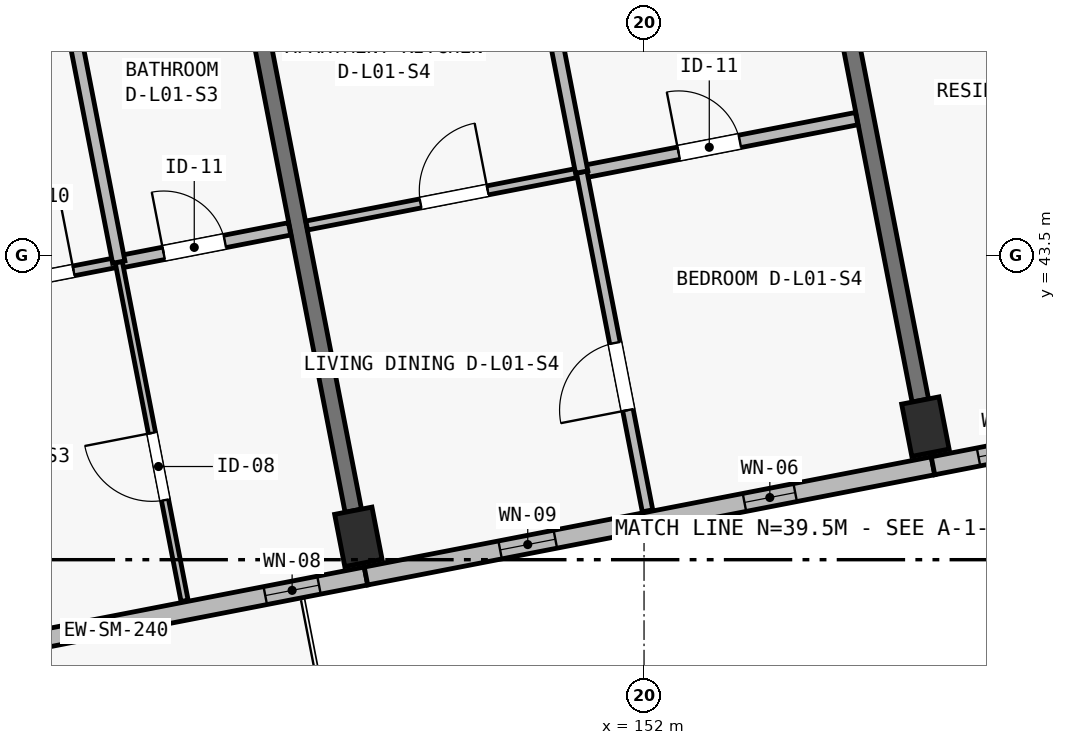
"""IFC4 building model, lengths in metres.
Left out: names, types, materials, properties, quantities, classifications, styles, units other than length and angle.
Written with IfcOpenShell. Run it as: python <this file> out.ifc"""

import sys

from ifc_helpers import new_model, si_unit, direction, frame, frame_2d, origin, origin_2d, place, context, subcontext, project, spatial, rectangle, extrude, element, fill, save


model = new_model("IFC4")
c1 = context("Model", 3, precision=1e-05, world=origin(), true_north=direction((0.0, 1.0)))
c2 = subcontext(c1, "Body", "Model", "MODEL_VIEW")
j1 = project(units=[si_unit("LENGTHUNIT", "METRE"), si_unit("PLANEANGLEUNIT", "RADIAN")], contexts=[c1])
p1 = place(None, origin())
s1 = spatial("IfcSite", under=j1, at=p1, CompositionType="ELEMENT")
p2 = place(p1, origin())
s2 = spatial("IfcBuilding", under=s1, at=p2, CompositionType="ELEMENT")
p3 = place(p2, frame((0.0, 0.0, 4.5)))
s3 = spatial("IfcBuildingStorey", under=s2, at=p3, CompositionType="ELEMENT", Elevation=4.5)
for number, where, z_axis, x_axis in (
    (1, (148.241, 39.801, 0.0), (0.0, 0.0, 1.0), (0.982, 0.191, 0.0)),
    (2, (155.702, 41.251, 0.0), (0.0, 0.0, 1.0), (0.982, 0.191, 0.0)),
):
    element("IfcColumn", number, at=place(p3, frame(where, z_axis=z_axis, x_axis=x_axis)), inside=s3, PredefinedType="COLUMN", context=c2, shape_type="SweptSolid", body=[
        extrude(rectangle(XDim=0.5, YDim=0.7, at=origin_2d()), origin(), (0.0, 0.0, 1.0), 3.9),
    ])
p4 = place(p3, frame((148.175, 40.144, -0.25), z_axis=(0.0, 0.0, 1.0), x_axis=(-0.190812837813, 0.981626436546, 0.0)))
e3 = element("IfcWall", 3, at=p4, inside=s3, PredefinedType="SHEAR", context=c2, shape_type="SweptSolid", body=[
    extrude(rectangle(XDim=6.9, YDim=0.22, at=frame_2d((3.45, 0.0))), origin(), (0.0, 0.0, 1.0), 3.4),
])
p5 = place(p3, frame((155.635, 41.594, -0.25), z_axis=(0.0, 0.0, 1.0), x_axis=(-0.190819465253, 0.981625148252, 0.0)))
e4 = element("IfcWall", 4, at=p5, inside=s3, PredefinedType="SHEAR", context=c2, shape_type="SweptSolid", body=[
    extrude(rectangle(XDim=6.9, YDim=0.22, at=frame_2d((3.45, 0.0))), origin(), (0.0, 0.0, 1.0), 3.4),
])
p6 = place(p3, frame((148.342, 39.285, 0.0), z_axis=(0.0, 0.0, 1.0), x_axis=(-0.981631269434, -0.190787973596, 0.0)))
e5 = element("IfcWall", 5, at=p6, inside=s3, PredefinedType="SOLIDWALL", context=c2, shape_type="SweptSolid", body=[
    extrude(rectangle(XDim=7.6, YDim=0.24, at=frame_2d((3.8, 0.0))), origin(), (0.0, 0.0, 1.0), 3.65),
])
p7 = place(p6, frame((5.169, 0.0, 0.0)))
e6 = element("IfcOpeningElement", 6, at=p7, cuts=e5, PredefinedType="OPENING", context=c2, shape_type="SweptSolid", body=[
    extrude(rectangle(XDim=1.5, YDim=2.12, at=frame_2d((0.75, 1.06))), frame((0.0, 0.135, 0.0), z_axis=(0.0, -1.0, 0.0), x_axis=(1.0, 0.0, 0.0)), (0.0, 0.0, 1.0), 0.27),
])
p8 = place(p6, frame((0.63, 0.0, 0.46)))
e7 = element("IfcOpeningElement", 7, at=p8, cuts=e5, PredefinedType="OPENING", context=c2, shape_type="SweptSolid", body=[
    extrude(rectangle(XDim=0.72, YDim=2.16, at=frame_2d((0.36, 1.08))), frame((0.0, 0.135, 0.0), z_axis=(0.0, -1.0, 0.0), x_axis=(1.0, 0.0, 0.0)), (0.0, 0.0, 1.0), 0.27),
])
p9 = place(p3, frame((155.802, 40.735, 0.0), z_axis=(0.0, 0.0, 1.0), x_axis=(-0.981626422232, -0.190812911449, 0.0)))
e8 = element("IfcWall", 8, at=p9, inside=s3, PredefinedType="SOLIDWALL", context=c2, shape_type="SweptSolid", body=[
    extrude(rectangle(XDim=7.6, YDim=0.24, at=frame_2d((3.8, 0.0))), origin(), (0.0, 0.0, 1.0), 3.65),
])
p10 = place(p9, frame((1.847, 0.0, 0.52)))
e9 = element("IfcOpeningElement", 9, at=p10, cuts=e8, PredefinedType="OPENING", context=c2, shape_type="SweptSolid", body=[
    extrude(rectangle(XDim=0.68, YDim=2.24, at=frame_2d((0.34, 1.12))), frame((0.0, 0.135, 0.0), z_axis=(0.0, -1.0, 0.0), x_axis=(1.0, 0.0, 0.0)), (0.0, 0.0, 1.0), 0.27),
])
p11 = place(p9, frame((5.062, 0.0, 0.52)))
e10 = element("IfcOpeningElement", 10, at=p11, cuts=e8, PredefinedType="OPENING", context=c2, shape_type="SweptSolid", body=[
    extrude(rectangle(XDim=0.74, YDim=2.26, at=frame_2d((0.37, 1.13))), frame((0.0, 0.135, 0.0), z_axis=(0.0, -1.0, 0.0), x_axis=(1.0, 0.0, 0.0)), (0.0, 0.0, 1.0), 0.27),
])
p12 = place(p3, frame((163.778, 42.286, 0.0), z_axis=(0.0, 0.0, 1.0), x_axis=(-0.981628367112, -0.190802905848, 0.0)))
e11 = element("IfcWall", 11, at=p12, inside=s3, PredefinedType="SOLIDWALL", context=c2, shape_type="SweptSolid", body=[
    extrude(rectangle(XDim=8.125, YDim=0.24, at=frame_2d((4.062, 0.0))), origin(), (0.0, 0.0, 1.0), 3.65),
])
p13 = place(p12, frame((1.223, 0.0, 0.42)))
e12 = element("IfcOpeningElement", 12, at=p13, cuts=e11, PredefinedType="OPENING", context=c2, shape_type="SweptSolid", body=[
    extrude(rectangle(XDim=0.78, YDim=2.2, at=frame_2d((0.39, 1.1))), frame((0.0, 0.135, 0.0), z_axis=(0.0, -1.0, 0.0), x_axis=(1.0, 0.0, 0.0)), (0.0, 0.0, 1.0), 0.27),
])
p14 = place(p12, frame((3.835, 0.0, 0.42)))
e13 = element("IfcOpeningElement", 13, at=p14, cuts=e11, PredefinedType="OPENING", context=c2, shape_type="SweptSolid", body=[
    extrude(rectangle(XDim=0.84, YDim=2.28, at=frame_2d((0.42, 1.14))), frame((0.0, 0.135, 0.0), z_axis=(0.0, -1.0, 0.0), x_axis=(1.0, 0.0, 0.0)), (0.0, 0.0, 1.0), 0.27),
])
p15 = place(p12, frame((6.655, 0.0, 0.48)))
e14 = element("IfcOpeningElement", 14, at=p15, cuts=e11, PredefinedType="OPENING", context=c2, shape_type="SweptSolid", body=[
    extrude(rectangle(XDim=0.86, YDim=2.36, at=frame_2d((0.43, 1.18))), frame((0.0, 0.135, 0.0), z_axis=(0.0, -1.0, 0.0), x_axis=(1.0, 0.0, 0.0)), (0.0, 0.0, 1.0), 0.27),
])
p16 = place(p3, frame((140.102, 42.446, 0.0), z_axis=(0.0, 0.0, 1.0), x_axis=(0.981621892043, 0.19083621528, 0.0)))
e15 = element("IfcWall", 15, at=p16, inside=s3, PredefinedType="PARTITIONING", context=c2, shape_type="SweptSolid", body=[
    extrude(rectangle(XDim=5.08, YDim=0.13, at=frame_2d((2.54, 0.0))), origin(), (0.0, 0.0, 1.0), 3.62),
])
p17 = place(p16, frame((3.595, 0.0, 0.0)))
e16 = element("IfcOpeningElement", 16, at=p17, cuts=e15, PredefinedType="OPENING", context=c2, shape_type="SweptSolid", body=[
    extrude(rectangle(XDim=0.88, YDim=2.1, at=frame_2d((0.44, 1.05))), frame((0.0, 0.08, 0.0), z_axis=(0.0, -1.0, 0.0), x_axis=(1.0, 0.0, 0.0)), (0.0, 0.0, 1.0), 0.16),
])
p18 = place(p3, frame((145.089, 43.416, 0.0), z_axis=(0.0, 0.0, 1.0), x_axis=(0.981640351498, 0.190741239147, 0.0)))
e17 = element("IfcWall", 17, at=p18, inside=s3, PredefinedType="PLUMBINGWALL", context=c2, shape_type="SweptSolid", body=[
    extrude(rectangle(XDim=2.29, YDim=0.165, at=frame_2d((1.145, 0.0))), origin(), (0.0, 0.0, 1.0), 3.62),
])
p19 = place(p18, frame((0.602, 0.0, 0.0)))
e18 = element("IfcOpeningElement", 18, at=p19, cuts=e17, PredefinedType="OPENING", context=c2, shape_type="SweptSolid", body=[
    extrude(rectangle(XDim=0.82, YDim=2.08, at=frame_2d((0.41, 1.04))), frame((0.0, 0.097, 0.0), z_axis=(0.0, -1.0, 0.0), x_axis=(1.0, 0.0, 0.0)), (0.0, 0.0, 1.0), 0.195),
])
p20 = place(p3, frame((145.955, 38.959, 0.0), z_axis=(0.0, 0.0, 1.0), x_axis=(-0.190797690541, 0.981629380817, 0.0)))
e19 = element("IfcWall", 19, at=p20, inside=s3, PredefinedType="PARTITIONING", context=c2, shape_type="SweptSolid", body=[
    extrude(rectangle(XDim=4.54, YDim=0.095, at=frame_2d((2.27, 0.0))), origin(), (0.0, 0.0, 1.0), 3.62),
])
p21 = place(p20, frame((1.35, 0.0, 0.0)))
e20 = element("IfcOpeningElement", 20, at=p21, cuts=e19, PredefinedType="OPENING", context=c2, shape_type="SweptSolid", body=[
    extrude(rectangle(XDim=0.9, YDim=2.1, at=frame_2d((0.45, 1.05))), frame((0.0, 0.062, 0.0), z_axis=(0.0, -1.0, 0.0), x_axis=(1.0, 0.0, 0.0)), (0.0, 0.0, 1.0), 0.125),
])
p22 = place(p3, frame((145.089, 43.416, 0.0), z_axis=(0.0, 0.0, 1.0), x_axis=(-0.190835887914, 0.981621955686, 0.0)))
e21 = element("IfcWall", 21, at=p22, inside=s3, PredefinedType="PLUMBINGWALL", context=c2, shape_type="SweptSolid", body=[
    extrude(rectangle(XDim=3.87, YDim=0.165, at=frame_2d((1.935, 0.0))), origin(), (0.0, 0.0, 1.0), 3.62),
])
p23 = place(p3, frame((147.562, 43.896, 0.0), z_axis=(0.0, 0.0, 1.0), x_axis=(0.981626422232, 0.190812911449, 0.0)))
e22 = element("IfcWall", 22, at=p23, inside=s3, PredefinedType="PARTITIONING", context=c2, shape_type="SweptSolid", body=[
    extrude(rectangle(XDim=3.685, YDim=0.12, at=frame_2d((1.842, 0.0))), origin(), (0.0, 0.0, 1.0), 3.62),
])
p24 = place(p23, frame((1.525, 0.0, 0.0)))
e23 = element("IfcOpeningElement", 23, at=p24, cuts=e22, PredefinedType="OPENING", context=c2, shape_type="SweptSolid", body=[
    extrude(rectangle(XDim=0.9, YDim=2.1, at=frame_2d((0.45, 1.05))), frame((0.0, 0.075, 0.0), z_axis=(0.0, -1.0, 0.0), x_axis=(1.0, 0.0, 0.0)), (0.0, 0.0, 1.0), 0.15),
])
p25 = place(p3, frame((151.18, 44.599, 0.0), z_axis=(0.0, 0.0, 1.0), x_axis=(0.981628834294, 0.190800502313, 0.0)))
e24 = element("IfcWall", 24, at=p25, inside=s3, PredefinedType="PLUMBINGWALL", context=c2, shape_type="SweptSolid", body=[
    extrude(rectangle(XDim=3.685, YDim=0.165, at=frame_2d((1.843, 0.0))), origin(), (0.0, 0.0, 1.0), 3.62),
])
p26 = place(p25, frame((1.3, 0.0, 0.0)))
e25 = element("IfcOpeningElement", 25, at=p26, cuts=e24, PredefinedType="OPENING", context=c2, shape_type="SweptSolid", body=[
    extrude(rectangle(XDim=0.82, YDim=2.08, at=frame_2d((0.41, 1.04))), frame((0.0, 0.097, 0.0), z_axis=(0.0, -1.0, 0.0), x_axis=(1.0, 0.0, 0.0)), (0.0, 0.0, 1.0), 0.195),
])
p27 = place(p3, frame((152.046, 40.143, 0.0), z_axis=(0.0, 0.0, 1.0), x_axis=(-0.190849508215, 0.981619307682, 0.0)))
e26 = element("IfcWall", 26, at=p27, inside=s3, PredefinedType="PARTITIONING", context=c2, shape_type="SweptSolid", body=[
    extrude(rectangle(XDim=4.54, YDim=0.14, at=frame_2d((2.27, 0.0))), origin(), (0.0, 0.0, 1.0), 3.62),
])
p28 = place(p27, frame((1.35, 0.0, 0.0)))
e27 = element("IfcOpeningElement", 27, at=p28, cuts=e26, PredefinedType="OPENING", context=c2, shape_type="SweptSolid", body=[
    extrude(rectangle(XDim=0.9, YDim=2.1, at=frame_2d((0.45, 1.05))), frame((0.0, 0.085, 0.0), z_axis=(0.0, -1.0, 0.0), x_axis=(1.0, 0.0, 0.0)), (0.0, 0.0, 1.0), 0.17),
])
p29 = place(p3, frame((151.18, 44.599, 0.0), z_axis=(0.0, 0.0, 1.0), x_axis=(-0.190763284403, 0.981636067656, 0.0)))
e28 = element("IfcWall", 28, at=p29, inside=s3, PredefinedType="PLUMBINGWALL", context=c2, shape_type="SweptSolid", body=[
    extrude(rectangle(XDim=3.87, YDim=0.165, at=frame_2d((1.935, 0.0))), origin(), (0.0, 0.0, 1.0), 3.62),
])
p30 = place(p8, origin())
e29 = element("IfcWindow", 29, at=p30, inside=s3, PartitioningType="SINGLE_PANEL", PredefinedType="WINDOW", context=c2, shape_type="SweptSolid", body=[
    extrude(rectangle(XDim=0.72, YDim=2.16, at=frame_2d((0.36, 1.08))), frame((0.0, 0.03, 0.0), z_axis=(0.0, -1.0, 0.0), x_axis=(1.0, 0.0, 0.0)), (0.0, 0.0, 1.0), 0.06),
])
fill(e7, e29)
p31 = place(p10, origin())
e30 = element("IfcWindow", 30, at=p31, inside=s3, PartitioningType="SINGLE_PANEL", PredefinedType="WINDOW", context=c2, shape_type="SweptSolid", body=[
    extrude(rectangle(XDim=0.68, YDim=2.24, at=frame_2d((0.34, 1.12))), frame((0.0, 0.03, 0.0), z_axis=(0.0, -1.0, 0.0), x_axis=(1.0, 0.0, 0.0)), (0.0, 0.0, 1.0), 0.06),
])
fill(e9, e30)
p32 = place(p11, origin())
e31 = element("IfcWindow", 31, at=p32, inside=s3, PartitioningType="SINGLE_PANEL", PredefinedType="WINDOW", context=c2, shape_type="SweptSolid", body=[
    extrude(rectangle(XDim=0.74, YDim=2.26, at=frame_2d((0.37, 1.13))), frame((0.0, 0.03, 0.0), z_axis=(0.0, -1.0, 0.0), x_axis=(1.0, 0.0, 0.0)), (0.0, 0.0, 1.0), 0.06),
])
fill(e10, e31)
p33 = place(p15, origin())
e32 = element("IfcWindow", 32, at=p33, inside=s3, PartitioningType="SINGLE_PANEL", PredefinedType="WINDOW", context=c2, shape_type="SweptSolid", body=[
    extrude(rectangle(XDim=0.86, YDim=2.36, at=frame_2d((0.43, 1.18))), frame((0.0, 0.03, 0.0), z_axis=(0.0, -1.0, 0.0), x_axis=(1.0, 0.0, 0.0)), (0.0, 0.0, 1.0), 0.06),
])
fill(e14, e32)
p34 = place(p17, origin())
e33 = element("IfcDoor", 33, at=p34, inside=s3, OperationType="SINGLE_SWING_RIGHT", PredefinedType="DOOR", context=c2, shape_type="SweptSolid", body=[
    extrude(rectangle(XDim=0.88, YDim=2.1, at=frame_2d((0.44, 1.05))), frame((0.0, 0.025, 0.0), z_axis=(0.0, -1.0, 0.0), x_axis=(1.0, 0.0, 0.0)), (0.0, 0.0, 1.0), 0.05),
])
fill(e16, e33)
p35 = place(p19, origin())
e34 = element("IfcDoor", 34, at=p35, inside=s3, OperationType="SINGLE_SWING_LEFT", PredefinedType="DOOR", context=c2, shape_type="SweptSolid", body=[
    extrude(rectangle(XDim=0.82, YDim=2.08, at=frame_2d((0.41, 1.04))), frame((0.0, 0.025, 0.0), z_axis=(0.0, -1.0, 0.0), x_axis=(1.0, 0.0, 0.0)), (0.0, 0.0, 1.0), 0.05),
])
fill(e18, e34)
p36 = place(p21, origin())
e35 = element("IfcDoor", 35, at=p36, inside=s3, OperationType="SINGLE_SWING_RIGHT", PredefinedType="DOOR", context=c2, shape_type="SweptSolid", body=[
    extrude(rectangle(XDim=0.9, YDim=2.1, at=frame_2d((0.45, 1.05))), frame((0.0, 0.025, 0.0), z_axis=(0.0, -1.0, 0.0), x_axis=(1.0, 0.0, 0.0)), (0.0, 0.0, 1.0), 0.05),
])
fill(e20, e35)
p37 = place(p24, origin())
e36 = element("IfcDoor", 36, at=p37, inside=s3, OperationType="SINGLE_SWING_RIGHT", PredefinedType="DOOR", context=c2, shape_type="SweptSolid", body=[
    extrude(rectangle(XDim=0.9, YDim=2.1, at=frame_2d((0.45, 1.05))), frame((0.0, 0.025, 0.0), z_axis=(0.0, -1.0, 0.0), x_axis=(1.0, 0.0, 0.0)), (0.0, 0.0, 1.0), 0.05),
])
fill(e23, e36)
p38 = place(p26, origin())
e37 = element("IfcDoor", 37, at=p38, inside=s3, OperationType="SINGLE_SWING_LEFT", PredefinedType="DOOR", context=c2, shape_type="SweptSolid", body=[
    extrude(rectangle(XDim=0.82, YDim=2.08, at=frame_2d((0.41, 1.04))), frame((0.0, 0.025, 0.0), z_axis=(0.0, -1.0, 0.0), x_axis=(1.0, 0.0, 0.0)), (0.0, 0.0, 1.0), 0.05),
])
fill(e25, e37)
p39 = place(p28, origin())
e38 = element("IfcDoor", 38, at=p39, inside=s3, OperationType="SINGLE_SWING_LEFT", PredefinedType="DOOR", context=c2, shape_type="SweptSolid", body=[
    extrude(rectangle(XDim=0.9, YDim=2.1, at=frame_2d((0.45, 1.05))), frame((0.0, 0.025, 0.0), z_axis=(0.0, -1.0, 0.0), x_axis=(1.0, 0.0, 0.0)), (0.0, 0.0, 1.0), 0.05),
])
fill(e27, e38)
save(model, sys.argv[1])
